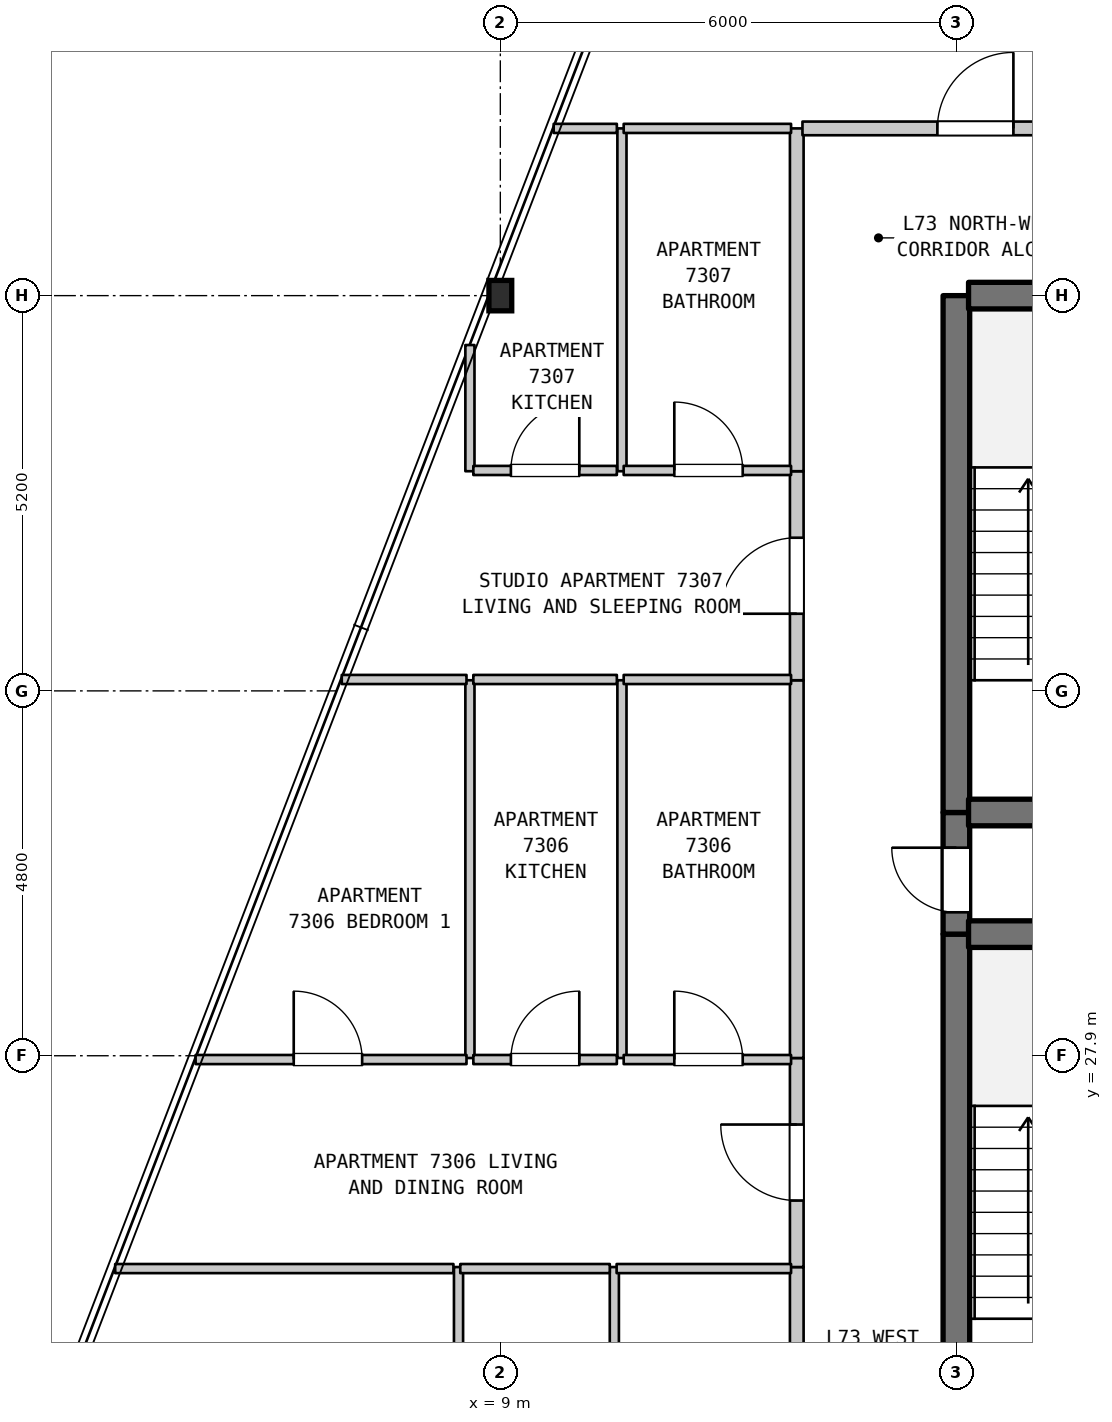
"""IFC4 building model, lengths in metres.
Left out: names, types, materials, properties, quantities, classifications, styles, units other than length and angle.
Written with IfcOpenShell. Run it as: python <this file> out.ifc"""

import sys

from ifc_helpers import new_model, si_unit, direction, frame, frame_2d, origin, origin_2d, place, context, subcontext, project, spatial, rectangle, i_section, extrude, element, fill, save


model = new_model("IFC4")
c1 = context("Model", 3, precision=1e-05, world=origin(), true_north=direction((0.0, 1.0)))
c2 = subcontext(c1, "Body", "Model", "MODEL_VIEW")
j1 = project(units=[si_unit("LENGTHUNIT", "METRE"), si_unit("PLANEANGLEUNIT", "RADIAN")], contexts=[c1])
p1 = place(None, origin())
s1 = spatial("IfcSite", under=j1, at=p1, CompositionType="ELEMENT")
p2 = place(p1, origin())
s2 = spatial("IfcBuilding", under=s1, at=p2, CompositionType="ELEMENT")
p3 = place(p2, frame((0.0, 0.0, 291.7)))
s3 = spatial("IfcBuildingStorey", under=s2, at=p3, CompositionType="ELEMENT", Elevation=291.7)
p4 = place(p3, frame((9.0, 37.9, 0.0), z_axis=(0.0, 0.0, 1.0), x_axis=(1.0, 0.0, 0.0)))
e1 = element("IfcColumn", 1, at=p4, inside=s3, PredefinedType="COLUMN", context=c2, shape_type="SweptSolid", body=[
    extrude(i_section(OverallWidth=0.3, OverallDepth=0.4, WebThickness=0.013, FlangeThickness=0.024, FilletRadius=0.027, at=origin_2d()), origin(), (0.0, 0.0, 1.0), 3.7),
])
p5 = place(p3, frame((8.45, 20.15, 0.0), z_axis=(0.0, 0.0, 1.0), x_axis=(0.0, 1.0, 0.0)))
e2 = element("IfcWall", 2, at=p5, inside=s3, PredefinedType="PARTITIONING", context=c2, shape_type="SweptSolid", body=[
    extrude(rectangle(XDim=4.97, YDim=0.12, at=frame_2d((2.485, 0.0))), origin(), (0.0, 0.0, 1.0), 3.39),
])
p6 = place(p3, frame((8.6, 27.87, 0.0), z_axis=(0.0, 0.0, 1.0), x_axis=(0.0, 1.0, 0.0)))
e3 = element("IfcWall", 3, at=p6, inside=s3, PredefinedType="PARTITIONING", context=c2, shape_type="SweptSolid", body=[
    extrude(rectangle(XDim=4.97, YDim=0.12, at=frame_2d((2.485, 0.0))), origin(), (0.0, 0.0, 1.0), 3.39),
])
p7 = place(p3, frame((8.6, 35.59, 0.0), z_axis=(0.0, 0.0, 1.0), x_axis=(0.0, 1.0, 0.0)))
e4 = element("IfcWall", 4, at=p7, inside=s3, PredefinedType="PARTITIONING", context=c2, shape_type="SweptSolid", body=[
    extrude(rectangle(XDim=1.66, YDim=0.12, at=frame_2d((0.83, 0.0))), origin(), (0.0, 0.0, 1.0), 3.39),
])
p8 = place(p3, frame((10.5, 20.15, 0.0), z_axis=(0.0, 0.0, 1.0), x_axis=(0.0, 1.0, 0.0)))
e5 = element("IfcWall", 5, at=p8, inside=s3, PredefinedType="PARTITIONING", context=c2, shape_type="SweptSolid", body=[
    extrude(rectangle(XDim=4.97, YDim=0.12, at=frame_2d((2.485, 0.0))), origin(), (0.0, 0.0, 1.0), 3.39),
])
p9 = place(p3, frame((10.6, 27.87, 0.0), z_axis=(0.0, 0.0, 1.0), x_axis=(0.0, 1.0, 0.0)))
e6 = element("IfcWall", 6, at=p9, inside=s3, PredefinedType="PARTITIONING", context=c2, shape_type="SweptSolid", body=[
    extrude(rectangle(XDim=4.97, YDim=0.12, at=frame_2d((2.485, 0.0))), origin(), (0.0, 0.0, 1.0), 3.39),
])
p10 = place(p3, frame((10.6, 35.59, 0.0), z_axis=(0.0, 0.0, 1.0), x_axis=(0.0, 1.0, 0.0)))
e7 = element("IfcWall", 7, at=p10, inside=s3, PredefinedType="PARTITIONING", context=c2, shape_type="SweptSolid", body=[
    extrude(rectangle(XDim=4.51, YDim=0.12, at=frame_2d((2.255, 0.0))), origin(), (0.0, 0.0, 1.0), 3.39),
])
p11 = place(p3, frame((12.9, 20.15, 0.0), z_axis=(0.0, 0.0, 1.0), x_axis=(0.0, 1.0, 0.0)))
e8 = element("IfcWall", 8, at=p11, inside=s3, PredefinedType="STANDARD", context=c2, shape_type="SweptSolid", body=[
    extrude(rectangle(XDim=4.97, YDim=0.18, at=frame_2d((2.485, 0.0))), origin(), (0.0, 0.0, 1.0), 3.39),
])
p12 = place(p3, frame((12.9, 25.12, 0.0), z_axis=(0.0, 0.0, 1.0), x_axis=(0.0, 1.0, 0.0)))
e9 = element("IfcWall", 9, at=p12, inside=s3, PredefinedType="STANDARD", context=c2, shape_type="SweptSolid", body=[
    extrude(rectangle(XDim=2.75, YDim=0.18, at=frame_2d((1.375, 0.0))), origin(), (0.0, 0.0, 1.0), 3.39),
])
p13 = place(p12, frame((0.875, 0.0, 0.0)))
e10 = element("IfcOpeningElement", 10, at=p13, cuts=e9, PredefinedType="OPENING", context=c2, shape_type="SweptSolid", body=[
    extrude(rectangle(XDim=1.0, YDim=2.15, at=frame_2d((0.5, 1.075))), frame((0.0, 0.1, 0.0), z_axis=(0.0, -1.0, 0.0), x_axis=(1.0, 0.0, 0.0)), (0.0, 0.0, 1.0), 0.2),
])
p14 = place(p3, frame((12.9, 27.87, 0.0), z_axis=(0.0, 0.0, 1.0), x_axis=(0.0, 1.0, 0.0)))
e11 = element("IfcWall", 11, at=p14, inside=s3, PredefinedType="STANDARD", context=c2, shape_type="SweptSolid", body=[
    extrude(rectangle(XDim=4.97, YDim=0.18, at=frame_2d((2.485, 0.0))), origin(), (0.0, 0.0, 1.0), 3.39),
])
p15 = place(p3, frame((12.9, 32.84, 0.0), z_axis=(0.0, 0.0, 1.0), x_axis=(0.0, 1.0, 0.0)))
e12 = element("IfcWall", 12, at=p15, inside=s3, PredefinedType="STANDARD", context=c2, shape_type="SweptSolid", body=[
    extrude(rectangle(XDim=2.75, YDim=0.18, at=frame_2d((1.375, 0.0))), origin(), (0.0, 0.0, 1.0), 3.39),
])
p16 = place(p15, frame((0.875, 0.0, 0.0)))
e13 = element("IfcOpeningElement", 13, at=p16, cuts=e12, PredefinedType="OPENING", context=c2, shape_type="SweptSolid", body=[
    extrude(rectangle(XDim=1.0, YDim=2.15, at=frame_2d((0.5, 1.075))), frame((0.0, 0.1, 0.0), z_axis=(0.0, -1.0, 0.0), x_axis=(1.0, 0.0, 0.0)), (0.0, 0.0, 1.0), 0.2),
])
p17 = place(p3, frame((12.9, 35.59, 0.0), z_axis=(0.0, 0.0, 1.0), x_axis=(0.0, 1.0, 0.0)))
e14 = element("IfcWall", 14, at=p17, inside=s3, PredefinedType="STANDARD", context=c2, shape_type="SweptSolid", body=[
    extrude(rectangle(XDim=4.51, YDim=0.18, at=frame_2d((2.255, 0.0))), origin(), (0.0, 0.0, 1.0), 3.39),
])
p18 = place(p3, frame((15.0, 22.7, 0.0), z_axis=(0.0, 0.0, 1.0), x_axis=(0.0, 1.0, 0.0)))
e15 = element("IfcWall", 15, at=p18, inside=s3, PredefinedType="SHEAR", context=c2, shape_type="SweptSolid", body=[
    extrude(rectangle(XDim=6.8, YDim=0.35, at=frame_2d((3.4, 0.0))), origin(), (0.0, 0.0, 1.0), 3.39),
])
p19 = place(p3, frame((15.0, 29.5, 0.0), z_axis=(0.0, 0.0, 1.0), x_axis=(0.0, 1.0, 0.0)))
e16 = element("IfcWall", 16, at=p19, inside=s3, PredefinedType="SHEAR", context=c2, shape_type="SweptSolid", body=[
    extrude(rectangle(XDim=1.6, YDim=0.35, at=frame_2d((0.8, 0.0))), origin(), (0.0, 0.0, 1.0), 3.39),
])
p20 = place(p19, frame((0.287, 0.0, 0.0)))
e17 = element("IfcOpeningElement", 17, at=p20, cuts=e16, PredefinedType="OPENING", context=c2, shape_type="SweptSolid", body=[
    extrude(rectangle(XDim=0.85, YDim=2.1, at=frame_2d((0.425, 1.05))), frame((0.0, 0.185, 0.0), z_axis=(0.0, -1.0, 0.0), x_axis=(1.0, 0.0, 0.0)), (0.0, 0.0, 1.0), 0.37),
])
p21 = place(p3, frame((15.0, 31.1, 0.0), z_axis=(0.0, 0.0, 1.0), x_axis=(0.0, 1.0, 0.0)))
e18 = element("IfcWall", 18, at=p21, inside=s3, PredefinedType="SHEAR", context=c2, shape_type="SweptSolid", body=[
    extrude(rectangle(XDim=6.8, YDim=0.35, at=frame_2d((3.4, 0.0))), origin(), (0.0, 0.0, 1.0), 3.39),
])
p22 = place(p3, frame((3.933, 25.1, 0.0), z_axis=(0.0, 0.0, 1.0), x_axis=(1.0, 0.0, 0.0)))
e19 = element("IfcWall", 19, at=p22, inside=s3, PredefinedType="PARTITIONING", context=c2, shape_type="SweptSolid", body=[
    extrude(rectangle(XDim=4.45, YDim=0.12, at=frame_2d((2.225, 0.0))), origin(), (0.0, 0.0, 1.0), 3.39),
])
p23 = place(p3, frame((8.473, 25.1, 0.0), z_axis=(0.0, 0.0, 1.0), x_axis=(1.0, 0.0, 0.0)))
e20 = element("IfcWall", 20, at=p23, inside=s3, PredefinedType="PARTITIONING", context=c2, shape_type="SweptSolid", body=[
    extrude(rectangle(XDim=1.967, YDim=0.12, at=frame_2d((0.983, 0.0))), origin(), (0.0, 0.0, 1.0), 3.39),
])
p24 = place(p3, frame((10.53, 25.1, 0.0), z_axis=(0.0, 0.0, 1.0), x_axis=(1.0, 0.0, 0.0)))
e21 = element("IfcWall", 21, at=p24, inside=s3, PredefinedType="PARTITIONING", context=c2, shape_type="SweptSolid", body=[
    extrude(rectangle(XDim=2.295, YDim=0.12, at=frame_2d((1.147, 0.0))), origin(), (0.0, 0.0, 1.0), 3.39),
])
p25 = place(p3, frame((4.991, 27.85, 0.0), z_axis=(0.0, 0.0, 1.0), x_axis=(1.0, 0.0, 0.0)))
e22 = element("IfcWall", 22, at=p25, inside=s3, PredefinedType="PARTITIONING", context=c2, shape_type="SweptSolid", body=[
    extrude(rectangle(XDim=3.564, YDim=0.12, at=frame_2d((1.782, 0.0))), origin(), (0.0, 0.0, 1.0), 3.39),
])
p26 = place(p25, frame((1.291, 0.0, 0.0)))
e23 = element("IfcOpeningElement", 23, at=p26, cuts=e22, PredefinedType="OPENING", context=c2, shape_type="SweptSolid", body=[
    extrude(rectangle(XDim=0.9, YDim=2.15, at=frame_2d((0.45, 1.075))), frame((0.0, 0.07, 0.0), z_axis=(0.0, -1.0, 0.0), x_axis=(1.0, 0.0, 0.0)), (0.0, 0.0, 1.0), 0.14),
])
p27 = place(p3, frame((8.645, 27.85, 0.0), z_axis=(0.0, 0.0, 1.0), x_axis=(1.0, 0.0, 0.0)))
e24 = element("IfcWall", 24, at=p27, inside=s3, PredefinedType="PARTITIONING", context=c2, shape_type="SweptSolid", body=[
    extrude(rectangle(XDim=1.888, YDim=0.12, at=frame_2d((0.944, 0.0))), origin(), (0.0, 0.0, 1.0), 3.39),
])
p28 = place(p27, frame((0.494, 0.0, 0.0)))
e25 = element("IfcOpeningElement", 25, at=p28, cuts=e24, PredefinedType="OPENING", context=c2, shape_type="SweptSolid", body=[
    extrude(rectangle(XDim=0.9, YDim=2.15, at=frame_2d((0.45, 1.075))), frame((0.0, 0.07, 0.0), z_axis=(0.0, -1.0, 0.0), x_axis=(1.0, 0.0, 0.0)), (0.0, 0.0, 1.0), 0.14),
])
p29 = place(p3, frame((10.623, 27.85, 0.0), z_axis=(0.0, 0.0, 1.0), x_axis=(1.0, 0.0, 0.0)))
e26 = element("IfcWall", 26, at=p29, inside=s3, PredefinedType="PARTITIONING", context=c2, shape_type="SweptSolid", body=[
    extrude(rectangle(XDim=2.202, YDim=0.12, at=frame_2d((1.101, 0.0))), origin(), (0.0, 0.0, 1.0), 3.39),
])
p30 = place(p29, frame((0.666, 0.0, 0.0)))
e27 = element("IfcOpeningElement", 27, at=p30, cuts=e26, PredefinedType="OPENING", context=c2, shape_type="SweptSolid", body=[
    extrude(rectangle(XDim=0.9, YDim=2.1, at=frame_2d((0.45, 1.05))), frame((0.0, 0.07, 0.0), z_axis=(0.0, -1.0, 0.0), x_axis=(1.0, 0.0, 0.0)), (0.0, 0.0, 1.0), 0.14),
])
for number, where, z_axis, x_axis in (
    (28, (15.16, 29.5, 0.0), (0.0, 0.0, 1.0), (1.0, 0.0, 0.0)),
    (29, (15.16, 31.1, 0.0), (0.0, 0.0, 1.0), (1.0, 0.0, 0.0)),
):
    element("IfcWall", number, at=place(p3, frame(where, z_axis=z_axis, x_axis=x_axis)), inside=s3, PredefinedType="SHEAR", context=c2, shape_type="SweptSolid", body=[
        extrude(rectangle(XDim=3.68, YDim=0.35, at=frame_2d((1.84, 0.0))), origin(), (0.0, 0.0, 1.0), 3.39),
    ])
p31 = place(p3, frame((6.914, 32.85, 0.0), z_axis=(0.0, 0.0, 1.0), x_axis=(1.0, 0.0, 0.0)))
e30 = element("IfcWall", 30, at=p31, inside=s3, PredefinedType="PARTITIONING", context=c2, shape_type="SweptSolid", body=[
    extrude(rectangle(XDim=1.641, YDim=0.12, at=frame_2d((0.82, 0.0))), origin(), (0.0, 0.0, 1.0), 3.39),
])
p32 = place(p3, frame((8.645, 32.85, 0.0), z_axis=(0.0, 0.0, 1.0), x_axis=(1.0, 0.0, 0.0)))
e31 = element("IfcWall", 31, at=p32, inside=s3, PredefinedType="PARTITIONING", context=c2, shape_type="SweptSolid", body=[
    extrude(rectangle(XDim=1.888, YDim=0.12, at=frame_2d((0.944, 0.0))), origin(), (0.0, 0.0, 1.0), 3.39),
])
p33 = place(p3, frame((10.623, 32.85, 0.0), z_axis=(0.0, 0.0, 1.0), x_axis=(1.0, 0.0, 0.0)))
e32 = element("IfcWall", 32, at=p33, inside=s3, PredefinedType="PARTITIONING", context=c2, shape_type="SweptSolid", body=[
    extrude(rectangle(XDim=2.202, YDim=0.12, at=frame_2d((1.101, 0.0))), origin(), (0.0, 0.0, 1.0), 3.39),
])
p34 = place(p3, frame((8.645, 35.6, 0.0), z_axis=(0.0, 0.0, 1.0), x_axis=(1.0, 0.0, 0.0)))
e33 = element("IfcWall", 33, at=p34, inside=s3, PredefinedType="PARTITIONING", context=c2, shape_type="SweptSolid", body=[
    extrude(rectangle(XDim=1.888, YDim=0.12, at=frame_2d((0.944, 0.0))), origin(), (0.0, 0.0, 1.0), 3.39),
])
p35 = place(p34, frame((0.494, 0.0, 0.0)))
e34 = element("IfcOpeningElement", 34, at=p35, cuts=e33, PredefinedType="OPENING", context=c2, shape_type="SweptSolid", body=[
    extrude(rectangle(XDim=0.9, YDim=2.15, at=frame_2d((0.45, 1.075))), frame((0.0, 0.07, 0.0), z_axis=(0.0, -1.0, 0.0), x_axis=(1.0, 0.0, 0.0)), (0.0, 0.0, 1.0), 0.14),
])
p36 = place(p3, frame((10.623, 35.6, 0.0), z_axis=(0.0, 0.0, 1.0), x_axis=(1.0, 0.0, 0.0)))
e35 = element("IfcWall", 35, at=p36, inside=s3, PredefinedType="PARTITIONING", context=c2, shape_type="SweptSolid", body=[
    extrude(rectangle(XDim=2.202, YDim=0.12, at=frame_2d((1.101, 0.0))), origin(), (0.0, 0.0, 1.0), 3.39),
])
p37 = place(p36, frame((0.666, 0.0, 0.0)))
e36 = element("IfcOpeningElement", 36, at=p37, cuts=e35, PredefinedType="OPENING", context=c2, shape_type="SweptSolid", body=[
    extrude(rectangle(XDim=0.9, YDim=2.1, at=frame_2d((0.45, 1.05))), frame((0.0, 0.07, 0.0), z_axis=(0.0, -1.0, 0.0), x_axis=(1.0, 0.0, 0.0)), (0.0, 0.0, 1.0), 0.14),
])
p38 = place(p3, frame((15.16, 37.9, 0.0), z_axis=(0.0, 0.0, 1.0), x_axis=(1.0, 0.0, 0.0)))
e37 = element("IfcWall", 37, at=p38, inside=s3, PredefinedType="SHEAR", context=c2, shape_type="SweptSolid", body=[
    extrude(rectangle(XDim=3.68, YDim=0.35, at=frame_2d((1.84, 0.0))), origin(), (0.0, 0.0, 1.0), 3.39),
])
p39 = place(p3, frame((9.702, 40.1, 0.0), z_axis=(0.0, 0.0, 1.0), x_axis=(1.0, 0.0, 0.0)))
e38 = element("IfcWall", 38, at=p39, inside=s3, PredefinedType="PARTITIONING", context=c2, shape_type="SweptSolid", body=[
    extrude(rectangle(XDim=0.831, YDim=0.12, at=frame_2d((0.416, 0.0))), origin(), (0.0, 0.0, 1.0), 3.39),
])
p40 = place(p3, frame((10.623, 40.1, 0.0), z_axis=(0.0, 0.0, 1.0), x_axis=(1.0, 0.0, 0.0)))
e39 = element("IfcWall", 39, at=p40, inside=s3, PredefinedType="PARTITIONING", context=c2, shape_type="SweptSolid", body=[
    extrude(rectangle(XDim=2.202, YDim=0.12, at=frame_2d((1.101, 0.0))), origin(), (0.0, 0.0, 1.0), 3.39),
])
p41 = place(p3, frame((12.975, 40.1, 0.0), z_axis=(0.0, 0.0, 1.0), x_axis=(1.0, 0.0, 0.0)))
e40 = element("IfcWall", 40, at=p41, inside=s3, PredefinedType="STANDARD", context=c2, shape_type="SweptSolid", body=[
    extrude(rectangle(XDim=4.58, YDim=0.18, at=frame_2d((2.29, 0.0))), origin(), (0.0, 0.0, 1.0), 3.39),
])
p42 = place(p41, frame((1.775, 0.0, 0.0)))
e41 = element("IfcOpeningElement", 41, at=p42, cuts=e40, PredefinedType="OPENING", context=c2, shape_type="SweptSolid", body=[
    extrude(rectangle(XDim=1.0, YDim=2.15, at=frame_2d((0.5, 1.075))), frame((0.0, 0.1, 0.0), z_axis=(0.0, -1.0, 0.0), x_axis=(1.0, 0.0, 0.0)), (0.0, 0.0, 1.0), 0.2),
])
p43 = place(p13, origin())
e42 = element("IfcDoor", 42, at=p43, inside=s3, OperationType="SINGLE_SWING_RIGHT", PredefinedType="DOOR", context=c2, shape_type="SweptSolid", body=[
    extrude(rectangle(XDim=1.0, YDim=2.15, at=frame_2d((0.5, 1.075))), frame((0.0, 0.025, 0.0), z_axis=(0.0, -1.0, 0.0), x_axis=(1.0, 0.0, 0.0)), (0.0, 0.0, 1.0), 0.05),
])
fill(e10, e42)
p44 = place(p16, origin())
e43 = element("IfcDoor", 43, at=p44, inside=s3, OperationType="SINGLE_SWING_LEFT", PredefinedType="DOOR", context=c2, shape_type="SweptSolid", body=[
    extrude(rectangle(XDim=1.0, YDim=2.15, at=frame_2d((0.5, 1.075))), frame((0.0, 0.025, 0.0), z_axis=(0.0, -1.0, 0.0), x_axis=(1.0, 0.0, 0.0)), (0.0, 0.0, 1.0), 0.05),
])
fill(e13, e43)
p45 = place(p20, origin())
e44 = element("IfcDoor", 44, at=p45, inside=s3, OperationType="SINGLE_SWING_RIGHT", PredefinedType="DOOR", context=c2, shape_type="SweptSolid", body=[
    extrude(rectangle(XDim=0.85, YDim=2.1, at=frame_2d((0.425, 1.05))), frame((0.0, 0.025, 0.0), z_axis=(0.0, -1.0, 0.0), x_axis=(1.0, 0.0, 0.0)), (0.0, 0.0, 1.0), 0.05),
])
fill(e17, e44)
p46 = place(p26, origin())
e45 = element("IfcDoor", 45, at=p46, inside=s3, OperationType="SINGLE_SWING_LEFT", PredefinedType="DOOR", context=c2, shape_type="SweptSolid", body=[
    extrude(rectangle(XDim=0.9, YDim=2.15, at=frame_2d((0.45, 1.075))), frame((0.0, 0.025, 0.0), z_axis=(0.0, -1.0, 0.0), x_axis=(1.0, 0.0, 0.0)), (0.0, 0.0, 1.0), 0.05),
])
fill(e23, e45)
p47 = place(p28, origin())
e46 = element("IfcDoor", 46, at=p47, inside=s3, OperationType="SINGLE_SWING_RIGHT", PredefinedType="DOOR", context=c2, shape_type="SweptSolid", body=[
    extrude(rectangle(XDim=0.9, YDim=2.15, at=frame_2d((0.45, 1.075))), frame((0.0, 0.025, 0.0), z_axis=(0.0, -1.0, 0.0), x_axis=(1.0, 0.0, 0.0)), (0.0, 0.0, 1.0), 0.05),
])
fill(e25, e46)
p48 = place(p30, origin())
e47 = element("IfcDoor", 47, at=p48, inside=s3, OperationType="SINGLE_SWING_LEFT", PredefinedType="DOOR", context=c2, shape_type="SweptSolid", body=[
    extrude(rectangle(XDim=0.9, YDim=2.1, at=frame_2d((0.45, 1.05))), frame((0.0, 0.025, 0.0), z_axis=(0.0, -1.0, 0.0), x_axis=(1.0, 0.0, 0.0)), (0.0, 0.0, 1.0), 0.05),
])
fill(e27, e47)
p49 = place(p35, origin())
e48 = element("IfcDoor", 48, at=p49, inside=s3, OperationType="SINGLE_SWING_RIGHT", PredefinedType="DOOR", context=c2, shape_type="SweptSolid", body=[
    extrude(rectangle(XDim=0.9, YDim=2.15, at=frame_2d((0.45, 1.075))), frame((0.0, 0.025, 0.0), z_axis=(0.0, -1.0, 0.0), x_axis=(1.0, 0.0, 0.0)), (0.0, 0.0, 1.0), 0.05),
])
fill(e34, e48)
p50 = place(p37, origin())
e49 = element("IfcDoor", 49, at=p50, inside=s3, OperationType="SINGLE_SWING_LEFT", PredefinedType="DOOR", context=c2, shape_type="SweptSolid", body=[
    extrude(rectangle(XDim=0.9, YDim=2.1, at=frame_2d((0.45, 1.05))), frame((0.0, 0.025, 0.0), z_axis=(0.0, -1.0, 0.0), x_axis=(1.0, 0.0, 0.0)), (0.0, 0.0, 1.0), 0.05),
])
fill(e36, e49)
p51 = place(p42, origin())
e50 = element("IfcDoor", 50, at=p51, inside=s3, OperationType="SINGLE_SWING_RIGHT", PredefinedType="DOOR", context=c2, shape_type="SweptSolid", body=[
    extrude(rectangle(XDim=1.0, YDim=2.15, at=frame_2d((0.5, 1.075))), frame((0.0, 0.025, 0.0), z_axis=(0.0, -1.0, 0.0), x_axis=(1.0, 0.0, 0.0)), (0.0, 0.0, 1.0), 0.05),
])
fill(e41, e50)
save(model, sys.argv[1])
